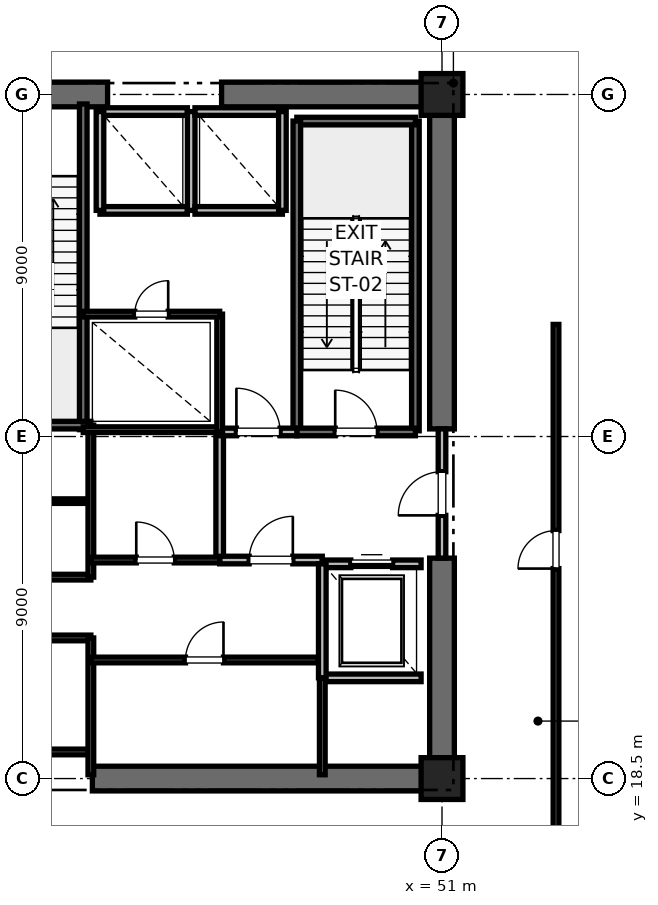
"""IFC4 building model, lengths in metres.
Left out: names, types, materials, properties, quantities, classifications, styles, units other than length and angle.
Written with IfcOpenShell. Run it as: python <this file> out.ifc"""

import sys

from ifc_helpers import new_model, si_unit, direction, frame, frame_2d, origin, origin_2d, place, context, subcontext, project, spatial, rectangle, extrude, element, fill, save


model = new_model("IFC4")
c1 = context("Model", 3, precision=1e-05, world=origin(), true_north=direction((0.0, 1.0)))
c2 = subcontext(c1, "Body", "Model", "MODEL_VIEW")
j1 = project(units=[si_unit("LENGTHUNIT", "METRE"), si_unit("PLANEANGLEUNIT", "RADIAN")], contexts=[c1])
p1 = place(None, origin())
s1 = spatial("IfcSite", under=j1, at=p1, CompositionType="ELEMENT")
p2 = place(p1, origin())
s2 = spatial("IfcBuilding", under=s1, at=p2, CompositionType="ELEMENT")
p3 = place(p2, frame((0.0, 0.0, 16.4)))
s3 = spatial("IfcBuildingStorey", under=s2, at=p3, CompositionType="ELEMENT", Elevation=16.4)
for number, where, z_axis, x_axis in (
    (1, (51.0, 18.5, 0.0), (0.0, 0.0, 1.0), (1.0, 0.0, 0.0)),
    (2, (51.0, 36.5, 0.0), (0.0, 0.0, 1.0), (1.0, 0.0, 0.0)),
):
    element("IfcColumn", number, at=place(p3, frame(where, z_axis=z_axis, x_axis=x_axis)), inside=s3, PredefinedType="PILASTER", context=c2, shape_type="SweptSolid", body=[
        extrude(rectangle(XDim=1.1, YDim=1.1, at=origin_2d()), origin(), (0.0, 0.0, 1.0), 5.2),
    ])
p4 = place(p3, frame((41.8, 18.5, 0.0), z_axis=(0.0, 0.0, 1.0), x_axis=(1.0, 0.0, 0.0)))
e3 = element("IfcWall", 3, at=p4, inside=s3, PredefinedType="SHEAR", context=c2, shape_type="SweptSolid", body=[
    extrude(rectangle(XDim=9.2, YDim=0.65, at=frame_2d((4.6, 0.0))), origin(), (0.0, 0.0, 1.0), 4.9),
])
p5 = place(p3, frame((37.8, 36.5, 0.0), z_axis=(0.0, 0.0, 1.0), x_axis=(1.0, 0.0, 0.0)))
e4 = element("IfcWall", 4, at=p5, inside=s3, PredefinedType="SHEAR", context=c2, shape_type="SweptSolid", body=[
    extrude(rectangle(XDim=4.4, YDim=0.65, at=frame_2d((2.2, 0.0))), origin(), (0.0, 0.0, 1.0), 4.9),
])
p6 = place(p5, frame((1.65, 0.0, 0.0)))
e5 = element("IfcOpeningElement", 5, at=p6, cuts=e4, PredefinedType="OPENING", context=c2, shape_type="SweptSolid", body=[
    extrude(rectangle(XDim=1.1, YDim=2.15, at=frame_2d((0.55, 1.075))), frame((0.0, 0.325, 0.0), z_axis=(0.0, -1.0, 0.0), x_axis=(1.0, 0.0, 0.0)), (0.0, 0.0, 1.0), 0.65),
])
for number, where, z_axis, x_axis in (
    (6, (45.2, 36.5, 0.0), (0.0, 0.0, 1.0), (1.0, 0.0, 0.0)),
    (7, (51.0, 18.5, 0.0), (0.0, 0.0, 1.0), (0.0, 1.0, 0.0)),
):
    element("IfcWall", number, at=place(p3, frame(where, z_axis=z_axis, x_axis=x_axis)), inside=s3, PredefinedType="SHEAR", context=c2, shape_type="SweptSolid", body=[
        extrude(rectangle(XDim=5.8, YDim=0.65, at=frame_2d((2.9, 0.0))), origin(), (0.0, 0.0, 1.0), 4.9),
    ])
p7 = place(p3, frame((51.0, 27.7, 0.0), z_axis=(0.0, 0.0, 1.0), x_axis=(0.0, 1.0, 0.0)))
e8 = element("IfcWall", 8, at=p7, inside=s3, PredefinedType="SHEAR", context=c2, shape_type="SweptSolid", body=[
    extrude(rectangle(XDim=8.8, YDim=0.65, at=frame_2d((4.4, 0.0))), origin(), (0.0, 0.0, 1.0), 4.9),
])
p8 = place(p3, frame((50.3, 27.65, 0.0), z_axis=(0.0, 0.0, 1.0), x_axis=(0.0, 1.0, 0.0)))
e9 = element("IfcWall", 9, at=p8, inside=s3, PredefinedType="SOLIDWALL", context=c2, shape_type="SweptSolid", body=[
    extrude(rectangle(XDim=8.15, YDim=0.2, at=frame_2d((4.075, 0.0))), origin(), (0.0, 0.0, 1.0), 4.9),
])
p9 = place(p3, frame((47.18, 35.8, 0.0), z_axis=(0.0, 0.0, 1.0), x_axis=(1.0, 0.0, 0.0)))
e10 = element("IfcWall", 10, at=p9, inside=s3, PredefinedType="SOLIDWALL", context=c2, shape_type="SweptSolid", body=[
    extrude(rectangle(XDim=3.12, YDim=0.2, at=frame_2d((1.56, 0.0))), origin(), (0.0, 0.0, 1.0), 4.9),
])
p10 = place(p3, frame((47.18, 27.62, 0.0), z_axis=(0.0, 0.0, 1.0), x_axis=(0.0, 1.0, 0.0)))
e11 = element("IfcWall", 11, at=p10, inside=s3, PredefinedType="SOLIDWALL", context=c2, shape_type="SweptSolid", body=[
    extrude(rectangle(XDim=8.18, YDim=0.2, at=frame_2d((4.09, 0.0))), origin(), (0.0, 0.0, 1.0), 4.9),
])
p11 = place(p3, frame((47.18, 27.62, 0.0), z_axis=(0.0, 0.0, 1.0), x_axis=(1.0, 0.0, 0.0)))
e12 = element("IfcWall", 12, at=p11, inside=s3, PredefinedType="SOLIDWALL", context=c2, shape_type="SweptSolid", body=[
    extrude(rectangle(XDim=3.12, YDim=0.2, at=frame_2d((1.56, 0.0))), origin(), (0.0, 0.0, 1.0), 4.9),
])
p12 = place(p11, frame((1.01, 0.0, 0.0)))
e13 = element("IfcOpeningElement", 13, at=p12, cuts=e12, PredefinedType="OPENING", context=c2, shape_type="SweptSolid", body=[
    extrude(rectangle(XDim=1.1, YDim=2.15, at=frame_2d((0.55, 1.075))), frame((0.0, 0.1, 0.0), z_axis=(0.0, -1.0, 0.0), x_axis=(1.0, 0.0, 0.0)), (0.0, 0.0, 1.0), 0.2),
])
p13 = place(p3, frame((41.56, 27.68, 0.0), z_axis=(0.0, 0.0, 1.0), x_axis=(0.0, 1.0, 0.0)))
e14 = element("IfcWall", 14, at=p13, inside=s3, PredefinedType="SOLIDWALL", context=c2, shape_type="SweptSolid", body=[
    extrude(rectangle(XDim=8.57, YDim=0.2, at=frame_2d((4.285, 0.0))), origin(), (0.0, 0.0, 1.0), 4.9),
])
p14 = place(p3, frame((38.44, 27.8, 0.0), z_axis=(0.0, 0.0, 1.0), x_axis=(1.0, 0.0, 0.0)))
e15 = element("IfcWall", 15, at=p14, inside=s3, PredefinedType="SOLIDWALL", context=c2, shape_type="SweptSolid", body=[
    extrude(rectangle(XDim=3.32, YDim=0.2, at=frame_2d((1.66, 0.0))), origin(), (0.0, 0.0, 1.0), 4.9),
])
p15 = place(p3, frame((45.15, 24.25, 0.0), z_axis=(0.0, 0.0, 1.0), x_axis=(0.0, 1.0, 0.0)))
e16 = element("IfcWall", 16, at=p15, inside=s3, PredefinedType="PARTITIONING", context=c2, shape_type="SweptSolid", body=[
    extrude(rectangle(XDim=3.37, YDim=0.2, at=frame_2d((1.685, 0.0))), origin(), (0.0, 0.0, 1.0), 4.9),
])
p16 = place(p3, frame((45.15, 24.25, 0.0), z_axis=(0.0, 0.0, 1.0), x_axis=(1.0, 0.0, 0.0)))
e17 = element("IfcWall", 17, at=p16, inside=s3, PredefinedType="PARTITIONING", context=c2, shape_type="SweptSolid", body=[
    extrude(rectangle(XDim=2.7, YDim=0.2, at=frame_2d((1.35, 0.0))), origin(), (0.0, 0.0, 1.0), 4.9),
])
p17 = place(p16, frame((0.775, 0.0, 0.0)))
e18 = element("IfcOpeningElement", 18, at=p17, cuts=e17, PredefinedType="OPENING", context=c2, shape_type="SweptSolid", body=[
    extrude(rectangle(XDim=1.15, YDim=2.2, at=frame_2d((0.575, 1.1))), frame((0.0, 0.1, 0.0), z_axis=(0.0, -1.0, 0.0), x_axis=(1.0, 0.0, 0.0)), (0.0, 0.0, 1.0), 0.2),
])
p18 = place(p3, frame((45.15, 27.62, 0.0), z_axis=(0.0, 0.0, 1.0), x_axis=(1.0, 0.0, 0.0)))
e19 = element("IfcWall", 19, at=p18, inside=s3, PredefinedType="PARTITIONING", context=c2, shape_type="SweptSolid", body=[
    extrude(rectangle(XDim=2.03, YDim=0.2, at=frame_2d((1.015, 0.0))), origin(), (0.0, 0.0, 1.0), 4.9),
])
p19 = place(p18, frame((0.44, 0.0, 0.0)))
e20 = element("IfcOpeningElement", 20, at=p19, cuts=e19, PredefinedType="OPENING", context=c2, shape_type="SweptSolid", body=[
    extrude(rectangle(XDim=1.15, YDim=2.2, at=frame_2d((0.575, 1.1))), frame((0.0, 0.1, 0.0), z_axis=(0.0, -1.0, 0.0), x_axis=(1.0, 0.0, 0.0)), (0.0, 0.0, 1.0), 0.2),
])
p20 = place(p3, frame((51.0, 24.3, 0.0), z_axis=(0.0, 0.0, 1.0), x_axis=(0.0, 1.0, 0.0)))
e21 = element("IfcWall", 21, at=p20, inside=s3, PredefinedType="PARTITIONING", context=c2, shape_type="SweptSolid", body=[
    extrude(rectangle(XDim=3.4, YDim=0.2, at=frame_2d((1.7, 0.0))), origin(), (0.0, 0.0, 1.0), 3.68),
])
p21 = place(p20, frame((1.125, 0.0, 0.0)))
e22 = element("IfcOpeningElement", 22, at=p21, cuts=e21, PredefinedType="OPENING", context=c2, shape_type="SweptSolid", body=[
    extrude(rectangle(XDim=1.15, YDim=2.2, at=frame_2d((0.575, 1.1))), frame((0.0, 0.1, 0.0), z_axis=(0.0, -1.0, 0.0), x_axis=(1.0, 0.0, 0.0)), (0.0, 0.0, 1.0), 0.2),
])
p22 = place(p3, frame((47.85, 21.15, 0.0), z_axis=(0.0, 0.0, 1.0), x_axis=(1.0, 0.0, 0.0)))
e23 = element("IfcWall", 23, at=p22, inside=s3, PredefinedType="SOLIDWALL", context=c2, shape_type="SweptSolid", body=[
    extrude(rectangle(XDim=2.6, YDim=0.2, at=frame_2d((1.3, 0.0))), origin(), (0.0, 0.0, 1.0), 4.9),
])
p23 = place(p3, frame((50.45, 24.15, 0.0), z_axis=(0.0, 0.0, 1.0), x_axis=(-1.0, 0.0, 0.0)))
e24 = element("IfcWall", 24, at=p23, inside=s3, PredefinedType="SOLIDWALL", context=c2, shape_type="SweptSolid", body=[
    extrude(rectangle(XDim=2.6, YDim=0.2, at=frame_2d((1.3, 0.0))), origin(), (0.0, 0.0, 1.0), 3.68),
])
p24 = place(p23, frame((0.75, 0.0, 0.0)))
e25 = element("IfcOpeningElement", 25, at=p24, cuts=e24, PredefinedType="OPENING", context=c2, shape_type="SweptSolid", body=[
    extrude(rectangle(XDim=1.1, YDim=2.2, at=frame_2d((0.55, 1.1))), frame((0.0, 0.1, 0.0), z_axis=(0.0, -1.0, 0.0), x_axis=(1.0, 0.0, 0.0)), (0.0, 0.0, 1.0), 0.2),
])
p25 = place(p3, frame((47.85, 24.15, 0.0), z_axis=(0.0, 0.0, 1.0), x_axis=(0.0, -1.0, 0.0)))
e26 = element("IfcWall", 26, at=p25, inside=s3, PredefinedType="SOLIDWALL", context=c2, shape_type="SweptSolid", body=[
    extrude(rectangle(XDim=3.0, YDim=0.2, at=frame_2d((1.5, 0.0))), origin(), (0.0, 0.0, 1.0), 4.9),
])
p26 = place(p3, frame((42.0, 33.45, 0.0), z_axis=(0.0, 0.0, 1.0), x_axis=(1.0, 0.0, 0.0)))
e27 = element("IfcWall", 27, at=p26, inside=s3, PredefinedType="SOLIDWALL", context=c2, shape_type="SweptSolid", body=[
    extrude(rectangle(XDim=2.3, YDim=0.2, at=frame_2d((1.15, 0.0))), origin(), (0.0, 0.0, 1.0), 4.9),
])
p27 = place(p3, frame((44.3, 36.05, 0.0), z_axis=(0.0, 0.0, 1.0), x_axis=(-1.0, 0.0, 0.0)))
e28 = element("IfcWall", 28, at=p27, inside=s3, PredefinedType="SOLIDWALL", context=c2, shape_type="SweptSolid", body=[
    extrude(rectangle(XDim=2.3, YDim=0.2, at=frame_2d((1.15, 0.0))), origin(), (0.0, 0.0, 1.0), 3.68),
])
for number, where, z_axis, x_axis in (
    (29, (42.0, 36.05, 0.0), (0.0, 0.0, 1.0), (0.0, -1.0, 0.0)),
    (30, (44.4, 33.45, 0.0), (0.0, 0.0, 1.0), (0.0, 1.0, 0.0)),
):
    element("IfcWall", number, at=place(p3, frame(where, z_axis=z_axis, x_axis=x_axis)), inside=s3, PredefinedType="SOLIDWALL", context=c2, shape_type="SweptSolid", body=[
        extrude(rectangle(XDim=2.6, YDim=0.2, at=frame_2d((1.3, 0.0))), origin(), (0.0, 0.0, 1.0), 3.68),
    ])
p28 = place(p3, frame((44.5, 33.45, 0.0), z_axis=(0.0, 0.0, 1.0), x_axis=(1.0, 0.0, 0.0)))
e31 = element("IfcWall", 31, at=p28, inside=s3, PredefinedType="SOLIDWALL", context=c2, shape_type="SweptSolid", body=[
    extrude(rectangle(XDim=2.3, YDim=0.2, at=frame_2d((1.15, 0.0))), origin(), (0.0, 0.0, 1.0), 4.9),
])
p29 = place(p3, frame((46.8, 36.05, 0.0), z_axis=(0.0, 0.0, 1.0), x_axis=(-1.0, 0.0, 0.0)))
e32 = element("IfcWall", 32, at=p29, inside=s3, PredefinedType="SOLIDWALL", context=c2, shape_type="SweptSolid", body=[
    extrude(rectangle(XDim=2.3, YDim=0.2, at=frame_2d((1.15, 0.0))), origin(), (0.0, 0.0, 1.0), 3.68),
])
p30 = place(p3, frame((46.8, 33.45, 0.0), z_axis=(0.0, 0.0, 1.0), x_axis=(0.0, 1.0, 0.0)))
e33 = element("IfcWall", 33, at=p30, inside=s3, PredefinedType="SOLIDWALL", context=c2, shape_type="SweptSolid", body=[
    extrude(rectangle(XDim=2.6, YDim=0.2, at=frame_2d((1.3, 0.0))), origin(), (0.0, 0.0, 1.0), 4.9),
])
for number, where, z_axis, x_axis in (
    (34, (39.95, 19.2, 0.0), (0.0, 0.0, 1.0), (1.0, 0.0, 0.0)),
    (35, (39.95, 22.2, 0.0), (0.0, 0.0, 1.0), (1.0, 0.0, 0.0)),
    (36, (39.95, 23.8, 0.0), (0.0, 0.0, 1.0), (1.0, 0.0, 0.0)),
):
    element("IfcWall", number, at=place(p3, frame(where, z_axis=z_axis, x_axis=x_axis)), inside=s3, PredefinedType="PARTITIONING", context=c2, shape_type="SweptSolid", body=[
        extrude(rectangle(XDim=1.81, YDim=0.15, at=frame_2d((0.905, 0.0))), origin(), (0.0, 0.0, 1.0), 2.85),
    ])
p31 = place(p3, frame((39.95, 25.8, 0.0), z_axis=(0.0, 0.0, 1.0), x_axis=(1.0, 0.0, 0.0)))
e37 = element("IfcWall", 37, at=p31, inside=s3, PredefinedType="PARTITIONING", context=c2, shape_type="SweptSolid", body=[
    extrude(rectangle(XDim=1.81, YDim=0.12, at=frame_2d((0.905, 0.0))), origin(), (0.0, 0.0, 1.0), 2.85),
])
p32 = place(p3, frame((41.76, 18.6, 0.0), z_axis=(0.0, 0.0, 1.0), x_axis=(0.0, 1.0, 0.0)))
e38 = element("IfcWall", 38, at=p32, inside=s3, PredefinedType="PARTITIONING", context=c2, shape_type="SweptSolid", body=[
    extrude(rectangle(XDim=3.6, YDim=0.15, at=frame_2d((1.8, 0.0))), origin(), (0.0, 0.0, 1.0), 2.85),
])
p33 = place(p3, frame((41.76, 23.8, 0.0), z_axis=(0.0, 0.0, 1.0), x_axis=(0.0, 1.0, 0.0)))
e39 = element("IfcWall", 39, at=p33, inside=s3, PredefinedType="PARTITIONING", context=c2, shape_type="SweptSolid", body=[
    extrude(rectangle(XDim=4.0, YDim=0.15, at=frame_2d((2.0, 0.0))), origin(), (0.0, 0.0, 1.0), 2.85),
])
p34 = place(p3, frame((41.56, 27.68, 0.0), z_axis=(0.0, 0.0, 1.0), x_axis=(1.0, 0.0, 0.0)))
e40 = element("IfcWall", 40, at=p34, inside=s3, PredefinedType="PARTITIONING", context=c2, shape_type="SweptSolid", body=[
    extrude(rectangle(XDim=3.59, YDim=0.15, at=frame_2d((1.795, 0.0))), origin(), (0.0, 0.0, 1.0), 2.85),
])
p35 = place(p3, frame((47.85, 18.6, 0.0), z_axis=(0.0, 0.0, 1.0), x_axis=(0.0, 1.0, 0.0)))
e41 = element("IfcWall", 41, at=p35, inside=s3, PredefinedType="PARTITIONING", context=c2, shape_type="SweptSolid", body=[
    extrude(rectangle(XDim=2.54, YDim=0.15, at=frame_2d((1.27, 0.0))), origin(), (0.0, 0.0, 1.0), 2.85),
])
p36 = place(p3, frame((41.76, 21.62, 0.0), z_axis=(0.0, 0.0, 1.0), x_axis=(1.0, 0.0, 0.0)))
e42 = element("IfcWall", 42, at=p36, inside=s3, PredefinedType="PARTITIONING", context=c2, shape_type="SweptSolid", body=[
    extrude(rectangle(XDim=5.98, YDim=0.15, at=frame_2d((2.99, 0.0))), origin(), (0.0, 0.0, 1.0), 2.85),
])
p37 = place(p36, frame((2.49, 0.0, 0.0)))
e43 = element("IfcOpeningElement", 43, at=p37, cuts=e42, PredefinedType="OPENING", context=c2, shape_type="SweptSolid", body=[
    extrude(rectangle(XDim=1.0, YDim=2.15, at=frame_2d((0.5, 1.075))), frame((0.0, 0.075, 0.0), z_axis=(0.0, -1.0, 0.0), x_axis=(1.0, 0.0, 0.0)), (0.0, 0.0, 1.0), 0.15),
])
p38 = place(p3, frame((41.76, 24.25, 0.0), z_axis=(0.0, 0.0, 1.0), x_axis=(1.0, 0.0, 0.0)))
e44 = element("IfcWall", 44, at=p38, inside=s3, PredefinedType="PARTITIONING", context=c2, shape_type="SweptSolid", body=[
    extrude(rectangle(XDim=3.39, YDim=0.15, at=frame_2d((1.695, 0.0))), origin(), (0.0, 0.0, 1.0), 2.85),
])
p39 = place(p38, frame((1.195, 0.0, 0.0)))
e45 = element("IfcOpeningElement", 45, at=p39, cuts=e44, PredefinedType="OPENING", context=c2, shape_type="SweptSolid", body=[
    extrude(rectangle(XDim=1.0, YDim=2.15, at=frame_2d((0.5, 1.075))), frame((0.0, 0.075, 0.0), z_axis=(0.0, -1.0, 0.0), x_axis=(1.0, 0.0, 0.0)), (0.0, 0.0, 1.0), 0.15),
])
p40 = place(p3, frame((45.15, 27.62, 0.0), z_axis=(0.0, 0.0, 1.0), x_axis=(0.0, 1.0, 0.0)))
e46 = element("IfcWall", 46, at=p40, inside=s3, PredefinedType="PARTITIONING", context=c2, shape_type="SweptSolid", body=[
    extrude(rectangle(XDim=3.1, YDim=0.15, at=frame_2d((1.55, 0.0))), origin(), (0.0, 0.0, 1.0), 2.85),
])
p41 = place(p3, frame((41.56, 30.72, 0.0), z_axis=(0.0, 0.0, 1.0), x_axis=(1.0, 0.0, 0.0)))
e47 = element("IfcWall", 47, at=p41, inside=s3, PredefinedType="PARTITIONING", context=c2, shape_type="SweptSolid", body=[
    extrude(rectangle(XDim=3.59, YDim=0.15, at=frame_2d((1.795, 0.0))), origin(), (0.0, 0.0, 1.0), 2.85),
])
p42 = place(p41, frame((1.355, 0.0, 0.0)))
e48 = element("IfcOpeningElement", 48, at=p42, cuts=e47, PredefinedType="OPENING", context=c2, shape_type="SweptSolid", body=[
    extrude(rectangle(XDim=0.88, YDim=2.1, at=frame_2d((0.44, 1.05))), frame((0.0, 0.075, 0.0), z_axis=(0.0, -1.0, 0.0), x_axis=(1.0, 0.0, 0.0)), (0.0, 0.0, 1.0), 0.15),
])
p43 = place(p3, frame((54.0, 16.0, 0.0), z_axis=(0.0, 0.0, 1.0), x_axis=(0.0, 1.0, 0.0)))
e49 = element("IfcWall", 49, at=p43, inside=s3, PredefinedType="PARTITIONING", context=c2, shape_type="SweptSolid", body=[
    extrude(rectangle(XDim=14.45, YDim=0.15, at=frame_2d((7.225, 0.0))), origin(), (0.0, 0.0, 1.0), 2.85),
])
p44 = place(p43, frame((8.025, 0.0, 0.0)))
e50 = element("IfcOpeningElement", 50, at=p44, cuts=e49, PredefinedType="OPENING", context=c2, shape_type="SweptSolid", body=[
    extrude(rectangle(XDim=1.0, YDim=2.15, at=frame_2d((0.5, 1.075))), frame((0.0, 0.075, 0.0), z_axis=(0.0, -1.0, 0.0), x_axis=(1.0, 0.0, 0.0)), (0.0, 0.0, 1.0), 0.15),
])
p45 = place(p12, origin())
e51 = element("IfcDoor", 51, at=p45, inside=s3, OperationType="SINGLE_SWING_LEFT", PredefinedType="DOOR", context=c2, shape_type="SweptSolid", body=[
    extrude(rectangle(XDim=1.1, YDim=2.15, at=frame_2d((0.55, 1.075))), frame((0.0, 0.025, 0.0), z_axis=(0.0, -1.0, 0.0), x_axis=(1.0, 0.0, 0.0)), (0.0, 0.0, 1.0), 0.05),
])
fill(e13, e51)
p46 = place(p17, origin())
e52 = element("IfcDoor", 52, at=p46, inside=s3, OperationType="SINGLE_SWING_RIGHT", PredefinedType="DOOR", context=c2, shape_type="SweptSolid", body=[
    extrude(rectangle(XDim=1.15, YDim=2.2, at=frame_2d((0.575, 1.1))), frame((0.0, 0.025, 0.0), z_axis=(0.0, -1.0, 0.0), x_axis=(1.0, 0.0, 0.0)), (0.0, 0.0, 1.0), 0.05),
])
fill(e18, e52)
p47 = place(p19, origin())
e53 = element("IfcDoor", 53, at=p47, inside=s3, OperationType="SINGLE_SWING_LEFT", PredefinedType="DOOR", context=c2, shape_type="SweptSolid", body=[
    extrude(rectangle(XDim=1.15, YDim=2.2, at=frame_2d((0.575, 1.1))), frame((0.0, 0.025, 0.0), z_axis=(0.0, -1.0, 0.0), x_axis=(1.0, 0.0, 0.0)), (0.0, 0.0, 1.0), 0.05),
])
fill(e20, e53)
p48 = place(p21, origin())
e54 = element("IfcDoor", 54, at=p48, inside=s3, OperationType="SINGLE_SWING_LEFT", PredefinedType="DOOR", context=c2, shape_type="SweptSolid", body=[
    extrude(rectangle(XDim=1.15, YDim=2.2, at=frame_2d((0.575, 1.1))), frame((0.0, 0.025, 0.0), z_axis=(0.0, -1.0, 0.0), x_axis=(1.0, 0.0, 0.0)), (0.0, 0.0, 1.0), 0.05),
])
fill(e22, e54)
p49 = place(p24, origin())
e55 = element("IfcDoor", 55, at=p49, inside=s3, OperationType="SLIDING_TO_RIGHT", PredefinedType="DOOR", context=c2, shape_type="SweptSolid", body=[
    extrude(rectangle(XDim=1.1, YDim=2.2, at=frame_2d((0.55, 1.1))), frame((0.0, 0.025, 0.0), z_axis=(0.0, -1.0, 0.0), x_axis=(1.0, 0.0, 0.0)), (0.0, 0.0, 1.0), 0.05),
])
fill(e25, e55)
p50 = place(p37, origin())
e56 = element("IfcDoor", 56, at=p50, inside=s3, OperationType="SINGLE_SWING_RIGHT", PredefinedType="DOOR", context=c2, shape_type="SweptSolid", body=[
    extrude(rectangle(XDim=1.0, YDim=2.15, at=frame_2d((0.5, 1.075))), frame((0.0, 0.025, 0.0), z_axis=(0.0, -1.0, 0.0), x_axis=(1.0, 0.0, 0.0)), (0.0, 0.0, 1.0), 0.05),
])
fill(e43, e56)
p51 = place(p39, origin())
e57 = element("IfcDoor", 57, at=p51, inside=s3, OperationType="SINGLE_SWING_LEFT", PredefinedType="DOOR", context=c2, shape_type="SweptSolid", body=[
    extrude(rectangle(XDim=1.0, YDim=2.15, at=frame_2d((0.5, 1.075))), frame((0.0, 0.025, 0.0), z_axis=(0.0, -1.0, 0.0), x_axis=(1.0, 0.0, 0.0)), (0.0, 0.0, 1.0), 0.05),
])
fill(e45, e57)
p52 = place(p42, origin())
e58 = element("IfcDoor", 58, at=p52, inside=s3, OperationType="SINGLE_SWING_RIGHT", PredefinedType="DOOR", context=c2, shape_type="SweptSolid", body=[
    extrude(rectangle(XDim=0.88, YDim=2.1, at=frame_2d((0.44, 1.05))), frame((0.0, 0.025, 0.0), z_axis=(0.0, -1.0, 0.0), x_axis=(1.0, 0.0, 0.0)), (0.0, 0.0, 1.0), 0.05),
])
fill(e48, e58)
p53 = place(p44, origin())
e59 = element("IfcDoor", 59, at=p53, inside=s3, OperationType="SINGLE_SWING_LEFT", PredefinedType="DOOR", context=c2, shape_type="SweptSolid", body=[
    extrude(rectangle(XDim=1.0, YDim=2.15, at=frame_2d((0.5, 1.075))), frame((0.0, 0.025, 0.0), z_axis=(0.0, -1.0, 0.0), x_axis=(1.0, 0.0, 0.0)), (0.0, 0.0, 1.0), 0.05),
])
fill(e50, e59)
save(model, sys.argv[1])
